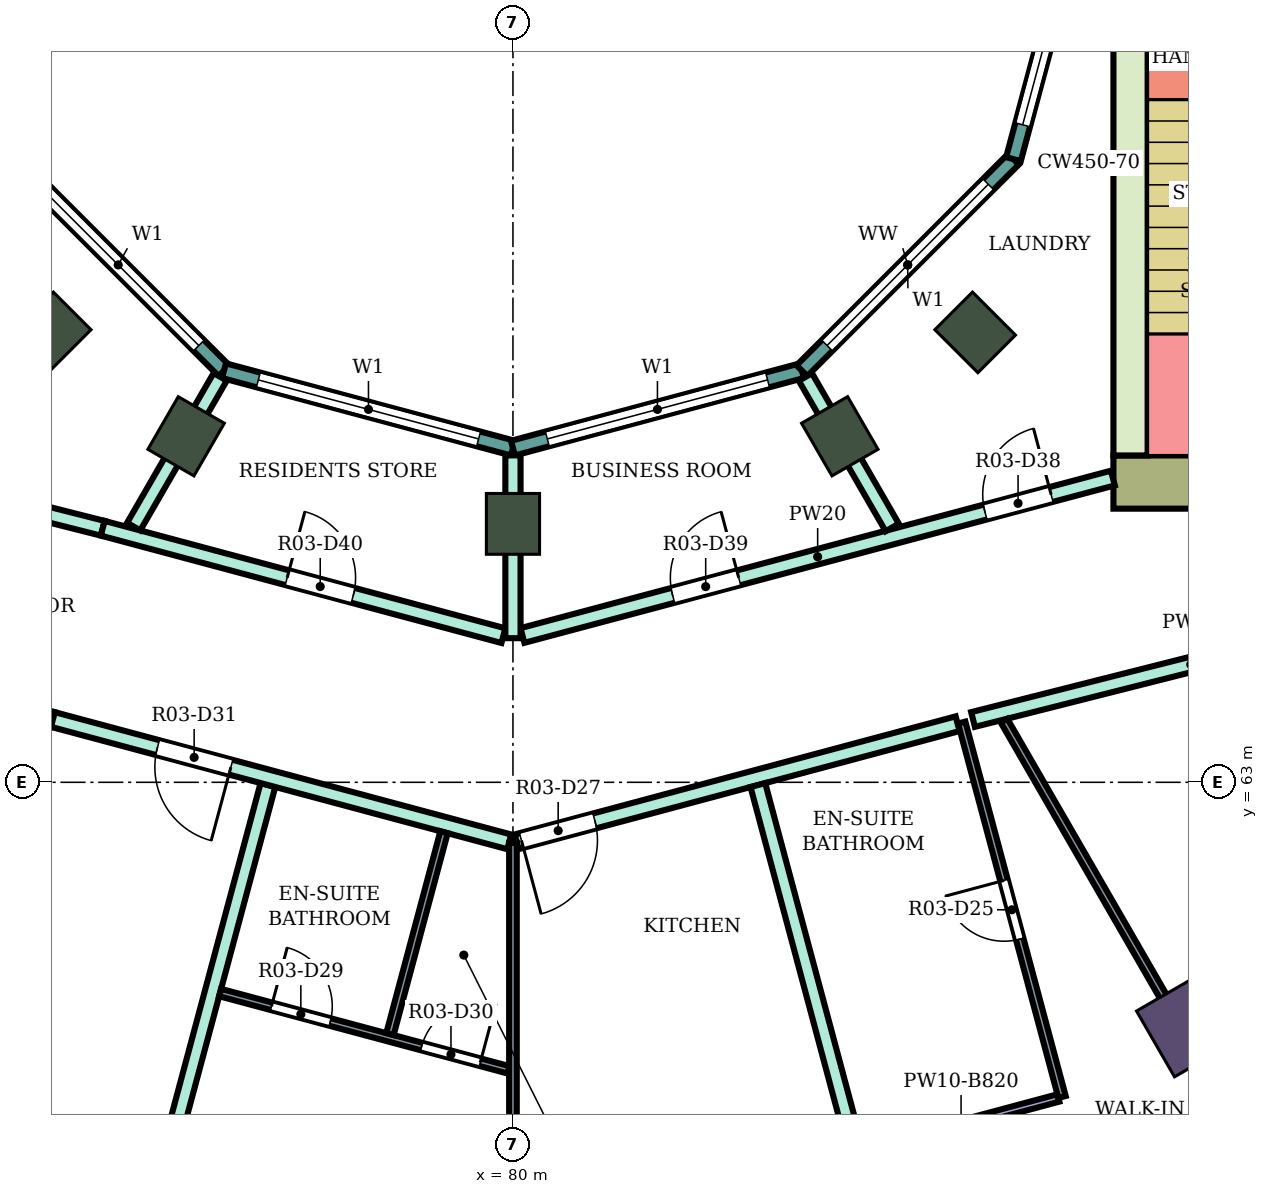
"""IFC4 building model, lengths in metres.
Left out: names, types, materials, properties, quantities, classifications, styles, units other than length and angle.
Written with IfcOpenShell. Run it as: python <this file> out.ifc"""

import sys

from ifc_helpers import new_model, si_unit, direction, frame, frame_2d, origin, origin_2d, place, context, subcontext, project, spatial, rectangle, extrude, element, fill, save


model = new_model("IFC4")
c1 = context("Model", 3, precision=1e-05, world=origin(), true_north=direction((0.0, 1.0)))
c2 = subcontext(c1, "Body", "Model", "MODEL_VIEW")
j1 = project(units=[si_unit("LENGTHUNIT", "METRE"), si_unit("PLANEANGLEUNIT", "RADIAN")], contexts=[c1])
p1 = place(None, origin())
s1 = spatial("IfcSite", under=j1, at=p1, CompositionType="ELEMENT")
p2 = place(p1, origin())
s2 = spatial("IfcBuilding", under=s1, at=p2, CompositionType="ELEMENT")
p3 = place(p2, frame((0.0, 0.0, 190.5)))
s3 = spatial("IfcBuildingStorey", under=s2, at=p3, CompositionType="ELEMENT", Elevation=190.5)
p4 = place(p3, frame((88.8, 59.758, 0.0), z_axis=(0.0, 0.0, 1.0), x_axis=(0.5, -0.866025403784, 0.0)))
e1 = element("IfcColumn", 1, at=p4, inside=s3, PredefinedType="COLUMN", context=c2, shape_type="SweptSolid", body=[
    extrude(rectangle(XDim=1.0, YDim=0.8, at=origin_2d()), origin(), (0.0, 0.0, 1.0), 4.1),
])
for number, where, z_axis, x_axis in (
    (2, (73.919, 68.919, 0.0), (0.0, 0.0, 1.0), (-0.707, -0.707, 0.0)),
    (3, (75.7, 67.552, 0.0), (0.0, 0.0, 1.0), (-0.5, -0.866, 0.0)),
    (4, (80.0, 66.4, 0.0), (0.0, 0.0, 1.0), (0.0, -1.0, 0.0)),
    (5, (84.3, 67.552, 0.0), (0.0, 0.0, 1.0), (0.5, -0.866, 0.0)),
    (6, (86.081, 68.919, 0.0), (0.0, 0.0, 1.0), (0.707, -0.707, 0.0)),
):
    element("IfcColumn", number, at=place(p3, frame(where, z_axis=z_axis, x_axis=x_axis)), inside=s3, PredefinedType="COLUMN", context=c2, shape_type="SweptSolid", body=[
        extrude(rectangle(XDim=0.8, YDim=0.7, at=origin_2d()), origin(), (0.0, 0.0, 1.0), 4.1),
    ])
p5 = place(p3, frame((87.9, 66.95, 0.0), z_axis=(0.0, 0.0, 1.0), x_axis=(1.0, 0.0, 0.0)))
e7 = element("IfcWall", 7, at=p5, inside=s3, PredefinedType="SHEAR", context=c2, shape_type="SweptSolid", body=[
    extrude(rectangle(XDim=14.8, YDim=0.7, at=frame_2d((7.4, 0.0))), origin(), (0.0, 0.0, 1.0), 3.78),
])
p6 = place(p5, frame((4.2, 0.0, 0.0)))
e8 = element("IfcOpeningElement", 8, at=p6, cuts=e7, PredefinedType="OPENING", context=c2, shape_type="SweptSolid", body=[
    extrude(rectangle(XDim=2.4, YDim=2.4, at=frame_2d((1.2, 1.2))), frame((0.0, 0.36, 0.0), z_axis=(0.0, -1.0, 0.0), x_axis=(1.0, 0.0, 0.0)), (0.0, 0.0, 1.0), 0.72),
])
p7 = place(p3, frame((88.125, 67.3, 0.0), z_axis=(0.0, 0.0, 1.0), x_axis=(0.0, 1.0, 0.0)))
e9 = element("IfcWall", 9, at=p7, inside=s3, PredefinedType="SHEAR", context=c2, shape_type="SweptSolid", body=[
    extrude(rectangle(XDim=7.7, YDim=0.45, at=frame_2d((3.85, 0.0))), origin(), (0.0, 0.0, 1.0), 3.78),
])
p8 = place(p3, frame((73.415, 71.198, 0.0), z_axis=(0.0, 0.0, 1.0), x_axis=(0.707106781187, -0.707106781187, 0.0)))
e10 = element("IfcWall", 10, at=p8, inside=s3, PredefinedType="NOTDEFINED", context=c2, shape_type="SweptSolid", body=[
    extrude(rectangle(XDim=3.936, YDim=0.2, at=frame_2d((1.968, 0.0))), origin(), (0.0, 0.0, 1.0), 4.1),
])
p9 = place(p8, frame((0.468, 0.0, 0.9)))
e11 = element("IfcOpeningElement", 11, at=p9, cuts=e10, PredefinedType="OPENING", context=c2, shape_type="SweptSolid", body=[
    extrude(rectangle(XDim=3.0, YDim=2.3, at=frame_2d((1.5, 1.15))), frame((0.0, 0.11, 0.0), z_axis=(0.0, -1.0, 0.0), x_axis=(1.0, 0.0, 0.0)), (0.0, 0.0, 1.0), 0.22),
])
p10 = place(p3, frame((76.198, 68.415, 0.0), z_axis=(0.0, 0.0, 1.0), x_axis=(0.965933654434, -0.258789828301, 0.0)))
e12 = element("IfcWall", 12, at=p10, inside=s3, PredefinedType="NOTDEFINED", context=c2, shape_type="SweptSolid", body=[
    extrude(rectangle(XDim=3.936, YDim=0.2, at=frame_2d((1.968, 0.0))), origin(), (0.0, 0.0, 1.0), 4.1),
])
p11 = place(p10, frame((0.468, 0.0, 0.9)))
e13 = element("IfcOpeningElement", 13, at=p11, cuts=e12, PredefinedType="OPENING", context=c2, shape_type="SweptSolid", body=[
    extrude(rectangle(XDim=3.0, YDim=2.3, at=frame_2d((1.5, 1.15))), frame((0.0, 0.11, 0.0), z_axis=(0.0, -1.0, 0.0), x_axis=(1.0, 0.0, 0.0)), (0.0, 0.0, 1.0), 0.22),
])
p12 = place(p3, frame((80.0, 67.396, 0.0), z_axis=(0.0, 0.0, 1.0), x_axis=(0.965933654434, 0.258789828301, 0.0)))
e14 = element("IfcWall", 14, at=p12, inside=s3, PredefinedType="NOTDEFINED", context=c2, shape_type="SweptSolid", body=[
    extrude(rectangle(XDim=3.936, YDim=0.2, at=frame_2d((1.968, 0.0))), origin(), (0.0, 0.0, 1.0), 4.1),
])
p13 = place(p12, frame((0.468, 0.0, 0.9)))
e15 = element("IfcOpeningElement", 15, at=p13, cuts=e14, PredefinedType="OPENING", context=c2, shape_type="SweptSolid", body=[
    extrude(rectangle(XDim=3.0, YDim=2.3, at=frame_2d((1.5, 1.15))), frame((0.0, 0.11, 0.0), z_axis=(0.0, -1.0, 0.0), x_axis=(1.0, 0.0, 0.0)), (0.0, 0.0, 1.0), 0.22),
])
p14 = place(p3, frame((83.802, 68.415, 0.0), z_axis=(0.0, 0.0, 1.0), x_axis=(0.707106781187, 0.707106781187, 0.0)))
e16 = element("IfcWall", 16, at=p14, inside=s3, PredefinedType="NOTDEFINED", context=c2, shape_type="SweptSolid", body=[
    extrude(rectangle(XDim=3.936, YDim=0.2, at=frame_2d((1.968, 0.0))), origin(), (0.0, 0.0, 1.0), 4.1),
])
p15 = place(p14, frame((0.468, 0.0, 0.9)))
e17 = element("IfcOpeningElement", 17, at=p15, cuts=e16, PredefinedType="OPENING", context=c2, shape_type="SweptSolid", body=[
    extrude(rectangle(XDim=3.0, YDim=2.3, at=frame_2d((1.5, 1.15))), frame((0.0, 0.11, 0.0), z_axis=(0.0, -1.0, 0.0), x_axis=(1.0, 0.0, 0.0)), (0.0, 0.0, 1.0), 0.22),
])
p16 = place(p3, frame((86.585, 71.198, 0.0), z_axis=(0.0, 0.0, 1.0), x_axis=(0.258789828301, 0.965933654434, 0.0)))
e18 = element("IfcWall", 18, at=p16, inside=s3, PredefinedType="NOTDEFINED", context=c2, shape_type="SweptSolid", body=[
    extrude(rectangle(XDim=3.936, YDim=0.2, at=frame_2d((1.968, 0.0))), origin(), (0.0, 0.0, 1.0), 4.1),
])
p17 = place(p16, frame((0.468, 0.0, 0.9)))
e19 = element("IfcOpeningElement", 19, at=p17, cuts=e18, PredefinedType="OPENING", context=c2, shape_type="SweptSolid", body=[
    extrude(rectangle(XDim=3.0, YDim=2.3, at=frame_2d((1.5, 1.15))), frame((0.0, 0.11, 0.0), z_axis=(0.0, -1.0, 0.0), x_axis=(1.0, 0.0, 0.0)), (0.0, 0.0, 1.0), 0.22),
])
p18 = place(p3, frame((69.899, 64.85, 0.0), z_axis=(0.0, 0.0, 1.0), x_axis=(0.969429930153, -0.245368316057, 0.0)))
e20 = element("IfcWall", 20, at=p18, inside=s3, PredefinedType="PARTITIONING", context=c2, shape_type="SweptSolid", body=[
    extrude(rectangle(XDim=4.176, YDim=0.2, at=frame_2d((2.088, 0.0))), origin(), (0.0, 0.0, 1.0), 3.65),
])
p19 = place(p3, frame((72.1, 66.975, 0.0), z_axis=(0.0, 0.0, 1.0), x_axis=(0.969471314457, -0.245204752086, 0.0)))
e21 = element("IfcWall", 21, at=p19, inside=s3, PredefinedType="PARTITIONING", context=c2, shape_type="SweptSolid", body=[
    extrude(rectangle(XDim=2.582, YDim=0.2, at=frame_2d((1.291, 0.0))), origin(), (0.0, 0.0, 1.0), 3.65),
])
p20 = place(p19, frame((0.841, 0.0, 0.0)))
e22 = element("IfcOpeningElement", 22, at=p20, cuts=e21, PredefinedType="OPENING", context=c2, shape_type="SweptSolid", body=[
    extrude(rectangle(XDim=0.9, YDim=2.1, at=frame_2d((0.45, 1.05))), frame((0.0, 0.11, 0.0), z_axis=(0.0, -1.0, 0.0), x_axis=(1.0, 0.0, 0.0)), (0.0, 0.0, 1.0), 0.22),
])
p21 = place(p3, frame((73.322, 50.081, 0.0), z_axis=(0.0, 0.0, 1.0), x_axis=(0.258965725415, 0.965886511481, 0.0)))
e23 = element("IfcWall", 23, at=p21, inside=s3, PredefinedType="PARTITIONING", context=c2, shape_type="SweptSolid", body=[
    extrude(rectangle(XDim=13.338, YDim=0.2, at=frame_2d((6.669, 0.0))), origin(), (0.0, 0.0, 1.0), 3.65),
])
p22 = place(p3, frame((73.947, 63.826, 0.0), z_axis=(0.0, 0.0, 1.0), x_axis=(0.965898432367, -0.258921258979, 0.0)))
e24 = element("IfcWall", 24, at=p22, inside=s3, PredefinedType="PARTITIONING", context=c2, shape_type="SweptSolid", body=[
    extrude(rectangle(XDim=6.217, YDim=0.2, at=frame_2d((3.108, 0.0))), origin(), (0.0, 0.0, 1.0), 3.65),
])
p23 = place(p22, frame((1.424, 0.0, 0.0)))
e25 = element("IfcOpeningElement", 25, at=p23, cuts=e24, PredefinedType="OPENING", context=c2, shape_type="SweptSolid", body=[
    extrude(rectangle(XDim=1.0, YDim=2.1, at=frame_2d((0.5, 1.05))), frame((0.0, 0.11, 0.0), z_axis=(0.0, -1.0, 0.0), x_axis=(1.0, 0.0, 0.0)), (0.0, 0.0, 1.0), 0.22),
])
p24 = place(p3, frame((74.603, 66.342, 0.0), z_axis=(0.0, 0.0, 1.0), x_axis=(0.965920893652, -0.258837453254, 0.0)))
e26 = element("IfcWall", 26, at=p24, inside=s3, PredefinedType="PARTITIONING", context=c2, shape_type="SweptSolid", body=[
    extrude(rectangle(XDim=5.458, YDim=0.2, at=frame_2d((2.729, 0.0))), origin(), (0.0, 0.0, 1.0), 3.65),
])
p25 = place(p24, frame((2.512, 0.0, 0.0)))
e27 = element("IfcOpeningElement", 27, at=p25, cuts=e26, PredefinedType="OPENING", context=c2, shape_type="SweptSolid", body=[
    extrude(rectangle(XDim=0.9, YDim=2.1, at=frame_2d((0.45, 1.05))), frame((0.0, 0.11, 0.0), z_axis=(0.0, -1.0, 0.0), x_axis=(1.0, 0.0, 0.0)), (0.0, 0.0, 1.0), 0.22),
])
p26 = place(p3, frame((75.01, 66.364, 0.0), z_axis=(0.0, 0.0, 1.0), x_axis=(0.500097042406, 0.865969369075, 0.0)))
e28 = element("IfcWall", 28, at=p26, inside=s3, PredefinedType="PARTITIONING", context=c2, shape_type="SweptSolid", body=[
    extrude(rectangle(XDim=2.275, YDim=0.2, at=frame_2d((1.138, 0.0))), origin(), (0.0, 0.0, 1.0), 3.65),
])
p27 = place(p3, frame((80.125, 64.932, 0.0), z_axis=(0.0, 0.0, 1.0), x_axis=(0.966236955806, 0.257655089674, 0.0)))
e29 = element("IfcWall", 29, at=p27, inside=s3, PredefinedType="PARTITIONING", context=c2, shape_type="SweptSolid", body=[
    extrude(rectangle(XDim=8.039, YDim=0.2, at=frame_2d((4.02, 0.0))), origin(), (0.0, 0.0, 1.0), 3.65),
])
p28 = place(p27, frame((6.298, 0.0, 0.0)))
e30 = element("IfcOpeningElement", 30, at=p28, cuts=e29, PredefinedType="OPENING", context=c2, shape_type="SweptSolid", body=[
    extrude(rectangle(XDim=0.9, YDim=2.1, at=frame_2d((0.45, 1.05))), frame((0.0, 0.11, 0.0), z_axis=(0.0, -1.0, 0.0), x_axis=(1.0, 0.0, 0.0)), (0.0, 0.0, 1.0), 0.22),
])
p29 = place(p27, frame((2.045, 0.0, 0.0)))
e31 = element("IfcOpeningElement", 31, at=p29, cuts=e29, PredefinedType="OPENING", context=c2, shape_type="SweptSolid", body=[
    extrude(rectangle(XDim=0.9, YDim=2.1, at=frame_2d((0.45, 1.05))), frame((0.0, 0.11, 0.0), z_axis=(0.0, -1.0, 0.0), x_axis=(1.0, 0.0, 0.0)), (0.0, 0.0, 1.0), 0.22),
])
p30 = place(p3, frame((80.048, 62.217, 0.0), z_axis=(0.0, 0.0, 1.0), x_axis=(0.965967276872, 0.258664299841, 0.0)))
e32 = element("IfcWall", 32, at=p30, inside=s3, PredefinedType="PARTITIONING", context=c2, shape_type="SweptSolid", body=[
    extrude(rectangle(XDim=6.007, YDim=0.2, at=frame_2d((3.003, 0.0))), origin(), (0.0, 0.0, 1.0), 3.65),
])
p31 = place(p30, frame((0.066, 0.0, 0.0)))
e33 = element("IfcOpeningElement", 33, at=p31, cuts=e32, PredefinedType="OPENING", context=c2, shape_type="SweptSolid", body=[
    extrude(rectangle(XDim=1.0, YDim=2.1, at=frame_2d((0.5, 1.05))), frame((0.0, 0.11, 0.0), z_axis=(0.0, -1.0, 0.0), x_axis=(1.0, 0.0, 0.0)), (0.0, 0.0, 1.0), 0.22),
])
p32 = place(p3, frame((80.0, 64.896, 0.0), z_axis=(0.0, 0.0, 1.0), x_axis=(0.0, 1.0, 0.0)))
e34 = element("IfcWall", 34, at=p32, inside=s3, PredefinedType="PARTITIONING", context=c2, shape_type="SweptSolid", body=[
    extrude(rectangle(XDim=2.405, YDim=0.2, at=frame_2d((1.203, 0.0))), origin(), (0.0, 0.0, 1.0), 3.65),
])
p33 = place(p3, frame((83.222, 62.964, 0.0), z_axis=(0.0, 0.0, 1.0), x_axis=(0.25865252128, -0.965970430829, 0.0)))
e35 = element("IfcWall", 35, at=p33, inside=s3, PredefinedType="PARTITIONING", context=c2, shape_type="SweptSolid", body=[
    extrude(rectangle(XDim=13.338, YDim=0.2, at=frame_2d((6.669, 0.0))), origin(), (0.0, 0.0, 1.0), 3.65),
])
p34 = place(p3, frame((83.847, 68.332, 0.0), z_axis=(0.0, 0.0, 1.0), x_axis=(0.499953638813, -0.866052168773, 0.0)))
e36 = element("IfcWall", 36, at=p34, inside=s3, PredefinedType="PARTITIONING", context=c2, shape_type="SweptSolid", body=[
    extrude(rectangle(XDim=2.285, YDim=0.2, at=frame_2d((1.143, 0.0))), origin(), (0.0, 0.0, 1.0), 3.65),
])
p35 = place(p3, frame((86.053, 63.826, 0.0), z_axis=(0.0, 0.0, 1.0), x_axis=(0.969490004987, 0.245130843083, 0.0)))
e37 = element("IfcWall", 37, at=p35, inside=s3, PredefinedType="PARTITIONING", context=c2, shape_type="SweptSolid", body=[
    extrude(rectangle(XDim=5.908, YDim=0.2, at=frame_2d((2.954, 0.0))), origin(), (0.0, 0.0, 1.0), 3.65),
])
p36 = place(p3, frame((76.147, 60.234, 0.0), z_axis=(0.0, 0.0, 1.0), x_axis=(0.965925861199, -0.258818914816, 0.0)))
e38 = element("IfcWall", 38, at=p36, inside=s3, PredefinedType="PARTITIONING", context=c2, shape_type="SweptSolid", body=[
    extrude(rectangle(XDim=3.929, YDim=0.1, at=frame_2d((1.964, 0.0))), origin(), (0.0, 0.0, 1.0), 3.65),
])
p37 = place(p36, frame((0.7, 0.0, 0.0)))
e39 = element("IfcOpeningElement", 39, at=p37, cuts=e38, PredefinedType="OPENING", context=c2, shape_type="SweptSolid", body=[
    extrude(rectangle(XDim=0.8, YDim=2.1, at=frame_2d((0.4, 1.05))), frame((0.0, 0.06, 0.0), z_axis=(0.0, -1.0, 0.0), x_axis=(1.0, 0.0, 0.0)), (0.0, 0.0, 1.0), 0.12),
])
p38 = place(p36, frame((2.745, 0.0, 0.0)))
e40 = element("IfcOpeningElement", 40, at=p38, cuts=e38, PredefinedType="OPENING", context=c2, shape_type="SweptSolid", body=[
    extrude(rectangle(XDim=0.8, YDim=2.1, at=frame_2d((0.4, 1.05))), frame((0.0, 0.06, 0.0), z_axis=(0.0, -1.0, 0.0), x_axis=(1.0, 0.0, 0.0)), (0.0, 0.0, 1.0), 0.12),
])
p39 = place(p3, frame((78.382, 59.687, 0.0), z_axis=(0.0, 0.0, 1.0), x_axis=(0.258629573817, 0.965976575051, 0.0)))
e41 = element("IfcWall", 41, at=p39, inside=s3, PredefinedType="PARTITIONING", context=c2, shape_type="SweptSolid", body=[
    extrude(rectangle(XDim=2.75, YDim=0.1, at=frame_2d((1.375, 0.0))), origin(), (0.0, 0.0, 1.0), 3.65),
])
p40 = place(p3, frame((80.0, 51.8, 0.0), z_axis=(0.0, 0.0, 1.0), x_axis=(0.0, 1.0, 0.0)))
e42 = element("IfcWall", 42, at=p40, inside=s3, PredefinedType="PARTITIONING", context=c2, shape_type="SweptSolid", body=[
    extrude(rectangle(XDim=10.404, YDim=0.1, at=frame_2d((5.202, 0.0))), origin(), (0.0, 0.0, 1.0), 3.65),
])
p41 = place(p40, frame((3.286, 0.0, 0.0)))
e43 = element("IfcOpeningElement", 43, at=p41, cuts=e42, PredefinedType="OPENING", context=c2, shape_type="SweptSolid", body=[
    extrude(rectangle(XDim=0.9, YDim=2.1, at=frame_2d((0.45, 1.05))), frame((0.0, 0.06, 0.0), z_axis=(0.0, -1.0, 0.0), x_axis=(1.0, 0.0, 0.0)), (0.0, 0.0, 1.0), 0.12),
])
p42 = place(p3, frame((84.615, 58.161, 0.0), z_axis=(0.0, 0.0, 1.0), x_axis=(0.965902408875, 0.258906424273, 0.0)))
e44 = element("IfcWall", 44, at=p42, inside=s3, PredefinedType="PARTITIONING", context=c2, shape_type="SweptSolid", body=[
    extrude(rectangle(XDim=2.651, YDim=0.1, at=frame_2d((1.325, 0.0))), origin(), (0.0, 0.0, 1.0), 3.28),
])
p43 = place(p3, frame((85.904, 63.786, 0.0), z_axis=(0.0, 0.0, 1.0), x_axis=(0.258857329124, -0.965915567303, 0.0)))
e45 = element("IfcWall", 45, at=p43, inside=s3, PredefinedType="PARTITIONING", context=c2, shape_type="SweptSolid", body=[
    extrude(rectangle(XDim=5.1, YDim=0.1, at=frame_2d((2.55, 0.0))), origin(), (0.0, 0.0, 1.0), 3.65),
])
p44 = place(p43, frame((2.15, 0.0, 0.0)))
e46 = element("IfcOpeningElement", 46, at=p44, cuts=e45, PredefinedType="OPENING", context=c2, shape_type="SweptSolid", body=[
    extrude(rectangle(XDim=0.8, YDim=2.1, at=frame_2d((0.4, 1.05))), frame((0.0, 0.06, 0.0), z_axis=(0.0, -1.0, 0.0), x_axis=(1.0, 0.0, 0.0)), (0.0, 0.0, 1.0), 0.12),
])
p45 = place(p3, frame((86.461, 63.81, 0.0), z_axis=(0.0, 0.0, 1.0), x_axis=(0.499911751641, -0.866076348004, 0.0)))
e47 = element("IfcWall", 47, at=p45, inside=s3, PredefinedType="PARTITIONING", context=c2, shape_type="SweptSolid", body=[
    extrude(rectangle(XDim=12.876, YDim=0.1, at=frame_2d((6.438, 0.0))), origin(), (0.0, 0.0, 1.0), 3.65),
])
p46 = place(p45, frame((9.514, 0.0, 0.0)))
e48 = element("IfcOpeningElement", 48, at=p46, cuts=e47, PredefinedType="OPENING", context=c2, shape_type="SweptSolid", body=[
    extrude(rectangle(XDim=0.9, YDim=2.1, at=frame_2d((0.45, 1.05))), frame((0.0, 0.06, 0.0), z_axis=(0.0, -1.0, 0.0), x_axis=(1.0, 0.0, 0.0)), (0.0, 0.0, 1.0), 0.12),
])
p47 = place(p9, origin())
e49 = element("IfcWindow", 49, at=p47, inside=s3, PartitioningType="SINGLE_PANEL", PredefinedType="WINDOW", context=c2, shape_type="SweptSolid", body=[
    extrude(rectangle(XDim=3.0, YDim=2.3, at=frame_2d((1.5, 1.15))), frame((0.0, 0.03, 0.0), z_axis=(0.0, -1.0, 0.0), x_axis=(1.0, 0.0, 0.0)), (0.0, 0.0, 1.0), 0.06),
])
fill(e11, e49)
p48 = place(p11, origin())
e50 = element("IfcWindow", 50, at=p48, inside=s3, PartitioningType="SINGLE_PANEL", PredefinedType="WINDOW", context=c2, shape_type="SweptSolid", body=[
    extrude(rectangle(XDim=3.0, YDim=2.3, at=frame_2d((1.5, 1.15))), frame((0.0, 0.03, 0.0), z_axis=(0.0, -1.0, 0.0), x_axis=(1.0, 0.0, 0.0)), (0.0, 0.0, 1.0), 0.06),
])
fill(e13, e50)
p49 = place(p13, origin())
e51 = element("IfcWindow", 51, at=p49, inside=s3, PartitioningType="SINGLE_PANEL", PredefinedType="WINDOW", context=c2, shape_type="SweptSolid", body=[
    extrude(rectangle(XDim=3.0, YDim=2.3, at=frame_2d((1.5, 1.15))), frame((0.0, 0.03, 0.0), z_axis=(0.0, -1.0, 0.0), x_axis=(1.0, 0.0, 0.0)), (0.0, 0.0, 1.0), 0.06),
])
fill(e15, e51)
p50 = place(p15, origin())
e52 = element("IfcWindow", 52, at=p50, inside=s3, PartitioningType="SINGLE_PANEL", PredefinedType="WINDOW", context=c2, shape_type="SweptSolid", body=[
    extrude(rectangle(XDim=3.0, YDim=2.3, at=frame_2d((1.5, 1.15))), frame((0.0, 0.03, 0.0), z_axis=(0.0, -1.0, 0.0), x_axis=(1.0, 0.0, 0.0)), (0.0, 0.0, 1.0), 0.06),
])
fill(e17, e52)
p51 = place(p17, origin())
e53 = element("IfcWindow", 53, at=p51, inside=s3, PartitioningType="SINGLE_PANEL", PredefinedType="WINDOW", context=c2, shape_type="SweptSolid", body=[
    extrude(rectangle(XDim=3.0, YDim=2.3, at=frame_2d((1.5, 1.15))), frame((0.0, 0.03, 0.0), z_axis=(0.0, -1.0, 0.0), x_axis=(1.0, 0.0, 0.0)), (0.0, 0.0, 1.0), 0.06),
])
fill(e19, e53)
p52 = place(p44, frame((0.8, 0.0, 0.0), z_axis=(0.0, 0.0, 1.0), x_axis=(-1.0, 0.0, 0.0)))
e54 = element("IfcDoor", 54, at=p52, inside=s3, OperationType="SINGLE_SWING_RIGHT", PredefinedType="DOOR", context=c2, shape_type="SweptSolid", body=[
    extrude(rectangle(XDim=0.8, YDim=2.1, at=frame_2d((0.4, 1.05))), frame((0.0, 0.025, 0.0), z_axis=(0.0, -1.0, 0.0), x_axis=(1.0, 0.0, 0.0)), (0.0, 0.0, 1.0), 0.05),
])
fill(e46, e54)
p53 = place(p31, frame((1.0, 0.0, 0.0), z_axis=(0.0, 0.0, 1.0), x_axis=(-1.0, 0.0, 0.0)))
e55 = element("IfcDoor", 55, at=p53, inside=s3, OperationType="SINGLE_SWING_RIGHT", PredefinedType="DOOR", context=c2, shape_type="SweptSolid", body=[
    extrude(rectangle(XDim=1.0, YDim=2.1, at=frame_2d((0.5, 1.05))), frame((0.0, 0.025, 0.0), z_axis=(0.0, -1.0, 0.0), x_axis=(1.0, 0.0, 0.0)), (0.0, 0.0, 1.0), 0.05),
])
fill(e33, e55)
p54 = place(p37, origin())
e56 = element("IfcDoor", 56, at=p54, inside=s3, OperationType="SINGLE_SWING_LEFT", PredefinedType="DOOR", context=c2, shape_type="SweptSolid", body=[
    extrude(rectangle(XDim=0.8, YDim=2.1, at=frame_2d((0.4, 1.05))), frame((0.0, 0.025, 0.0), z_axis=(0.0, -1.0, 0.0), x_axis=(1.0, 0.0, 0.0)), (0.0, 0.0, 1.0), 0.05),
])
fill(e39, e56)
p55 = place(p38, origin())
e57 = element("IfcDoor", 57, at=p55, inside=s3, OperationType="SINGLE_SWING_RIGHT", PredefinedType="DOOR", context=c2, shape_type="SweptSolid", body=[
    extrude(rectangle(XDim=0.8, YDim=2.1, at=frame_2d((0.4, 1.05))), frame((0.0, 0.025, 0.0), z_axis=(0.0, -1.0, 0.0), x_axis=(1.0, 0.0, 0.0)), (0.0, 0.0, 1.0), 0.05),
])
fill(e40, e57)
p56 = place(p23, frame((1.0, 0.0, 0.0), z_axis=(0.0, 0.0, 1.0), x_axis=(-1.0, 0.0, 0.0)))
e58 = element("IfcDoor", 58, at=p56, inside=s3, OperationType="SINGLE_SWING_LEFT", PredefinedType="DOOR", context=c2, shape_type="SweptSolid", body=[
    extrude(rectangle(XDim=1.0, YDim=2.1, at=frame_2d((0.5, 1.05))), frame((0.0, 0.025, 0.0), z_axis=(0.0, -1.0, 0.0), x_axis=(1.0, 0.0, 0.0)), (0.0, 0.0, 1.0), 0.05),
])
fill(e25, e58)
p57 = place(p28, origin())
e59 = element("IfcDoor", 59, at=p57, inside=s3, OperationType="SINGLE_SWING_RIGHT", PredefinedType="DOOR", context=c2, shape_type="SweptSolid", body=[
    extrude(rectangle(XDim=0.9, YDim=2.1, at=frame_2d((0.45, 1.05))), frame((0.0, 0.025, 0.0), z_axis=(0.0, -1.0, 0.0), x_axis=(1.0, 0.0, 0.0)), (0.0, 0.0, 1.0), 0.05),
])
fill(e30, e59)
p58 = place(p29, origin())
e60 = element("IfcDoor", 60, at=p58, inside=s3, OperationType="SINGLE_SWING_RIGHT", PredefinedType="DOOR", context=c2, shape_type="SweptSolid", body=[
    extrude(rectangle(XDim=0.9, YDim=2.1, at=frame_2d((0.45, 1.05))), frame((0.0, 0.025, 0.0), z_axis=(0.0, -1.0, 0.0), x_axis=(1.0, 0.0, 0.0)), (0.0, 0.0, 1.0), 0.05),
])
fill(e31, e60)
p59 = place(p25, origin())
e61 = element("IfcDoor", 61, at=p59, inside=s3, OperationType="SINGLE_SWING_LEFT", PredefinedType="DOOR", context=c2, shape_type="SweptSolid", body=[
    extrude(rectangle(XDim=0.9, YDim=2.1, at=frame_2d((0.45, 1.05))), frame((0.0, 0.025, 0.0), z_axis=(0.0, -1.0, 0.0), x_axis=(1.0, 0.0, 0.0)), (0.0, 0.0, 1.0), 0.05),
])
fill(e27, e61)
save(model, sys.argv[1])
